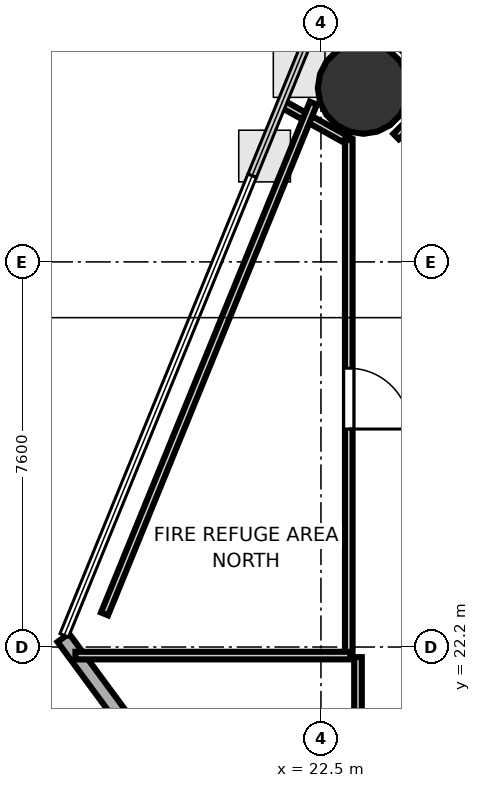
"""IFC4 building model, lengths in metres.
Left out: names, types, materials, properties, quantities, classifications, styles, units other than length and angle.
Written with IfcOpenShell. Run it as: python <this file> out.ifc"""

import sys

from ifc_helpers import new_model, si_unit, direction, frame, frame_2d, origin, origin_2d, place, context, subcontext, project, spatial, rectangle, hollow_circle, extrude, element, fill, save


model = new_model("IFC4")
c1 = context("Model", 3, precision=1e-05, world=origin(), true_north=direction((0.0, 1.0)))
c2 = subcontext(c1, "Body", "Model", "MODEL_VIEW")
j1 = project(units=[si_unit("LENGTHUNIT", "METRE"), si_unit("PLANEANGLEUNIT", "RADIAN")], contexts=[c1])
p1 = place(None, origin())
s1 = spatial("IfcSite", under=j1, at=p1, CompositionType="ELEMENT")
p2 = place(p1, origin())
s2 = spatial("IfcBuilding", under=s1, at=p2, CompositionType="ELEMENT")
p3 = place(p2, frame((0.0, 0.0, 47.9)))
s3 = spatial("IfcBuildingStorey", under=s2, at=p3, CompositionType="ELEMENT", Elevation=47.9)
p4 = place(p3, frame((23.338, 33.228, 0.0), z_axis=(0.0, 0.0, 1.0), x_axis=(1.0, 0.0, 0.0)))
e1 = element("IfcColumn", 1, at=p4, inside=s3, PredefinedType="COLUMN", context=c2, shape_type="SweptSolid", body=[
    extrude(hollow_circle(Radius=0.9, WallThickness=0.045, at=origin_2d()), origin(), (0.0, 0.0, 1.0), 4.6),
])
p5 = place(p3, frame((17.415, 22.384, 0.0), z_axis=(0.0, 0.0, 1.0), x_axis=(0.593055059992, -0.805161906587, 0.0)))
e2 = element("IfcWall", 2, at=p5, inside=s3, PredefinedType="SOLIDWALL", context=c2, shape_type="SweptSolid", body=[
    extrude(rectangle(XDim=12.668, YDim=0.28, at=frame_2d((6.334, 0.0))), origin(), (0.0, 0.0, 1.0), 4.42),
])
p6 = place(p5, frame((3.101, 0.0, 1.0)))
e3 = element("IfcOpeningElement", 3, at=p6, cuts=e2, PredefinedType="OPENING", context=c2, shape_type="SweptSolid", body=[
    extrude(rectangle(XDim=1.4, YDim=1.5, at=frame_2d((0.7, 0.75))), frame((0.0, 0.15, 0.0), z_axis=(0.0, -1.0, 0.0), x_axis=(1.0, 0.0, 0.0)), (0.0, 0.0, 1.0), 0.3),
])
p7 = place(p3, frame((21.708, 32.935, 0.0), z_axis=(0.0, 0.0, 1.0), x_axis=(0.873014270305, -0.487694662512, 0.0)))
e4 = element("IfcWall", 4, at=p7, inside=s3, PredefinedType="PARTITIONING", context=c2, shape_type="SweptSolid", body=[
    extrude(rectangle(XDim=1.555, YDim=0.15, at=frame_2d((0.777, 0.0))), origin(), (0.0, 0.0, 1.0), 2.94),
])
p8 = place(p3, frame((23.049, 32.204, 0.0), z_axis=(0.0, 0.0, 1.0), x_axis=(0.0, -1.0, 0.0)))
e5 = element("IfcWall", 5, at=p8, inside=s3, PredefinedType="PARTITIONING", context=c2, shape_type="SweptSolid", body=[
    extrude(rectangle(XDim=10.204, YDim=0.15, at=frame_2d((5.102, 0.0))), origin(), (0.0, 0.0, 1.0), 2.94),
])
p9 = place(p8, frame((4.502, 0.0, 0.0)))
e6 = element("IfcOpeningElement", 6, at=p9, cuts=e5, PredefinedType="OPENING", context=c2, shape_type="SweptSolid", body=[
    extrude(rectangle(XDim=1.2, YDim=2.15, at=frame_2d((0.6, 1.075))), frame((0.0, 0.085, 0.0), z_axis=(0.0, -1.0, 0.0), x_axis=(1.0, 0.0, 0.0)), (0.0, 0.0, 1.0), 0.17),
])
p10 = place(p3, frame((23.08, 22.031, 0.0), z_axis=(0.0, 0.0, 1.0), x_axis=(-1.0, 0.0, 0.0)))
e7 = element("IfcWall", 7, at=p10, inside=s3, PredefinedType="PARTITIONING", context=c2, shape_type="SweptSolid", body=[
    extrude(rectangle(XDim=5.426, YDim=0.15, at=frame_2d((2.713, 0.0))), origin(), (0.0, 0.0, 1.0), 2.94),
])
p11 = place(p3, frame((18.229, 22.854, 0.0), z_axis=(0.0, 0.0, 1.0), x_axis=(0.378492290578, 0.925604443579, 0.0)))
e8 = element("IfcWall", 8, at=p11, inside=s3, PredefinedType="PARTITIONING", context=c2, shape_type="SweptSolid", body=[
    extrude(rectangle(XDim=10.889, YDim=0.15, at=frame_2d((5.445, 0.0))), origin(), (0.0, 0.0, 1.0), 2.94),
])
p12 = place(p3, frame((24.291, 33.872, 0.0), z_axis=(0.0, 0.0, 1.0), x_axis=(-0.707386104394, 0.706827347597, 0.0)))
e9 = element("IfcWall", 9, at=p12, inside=s3, PredefinedType="PARTITIONING", context=c2, shape_type="SweptSolid", body=[
    extrude(rectangle(XDim=0.437, YDim=0.15, at=frame_2d((0.219, 0.0))), origin(), (0.0, 0.0, 1.0), 2.94),
])
p13 = place(p3, frame((23.231, 18.087, 0.0), z_axis=(0.0, 0.0, 1.0), x_axis=(0.0, 1.0, 0.0)))
e10 = element("IfcWall", 10, at=p13, inside=s3, PredefinedType="PARTITIONING", context=c2, shape_type="SweptSolid", body=[
    extrude(rectangle(XDim=3.913, YDim=0.15, at=frame_2d((1.957, 0.0))), origin(), (0.0, 0.0, 1.0), 2.94),
])
p14 = place(p13, frame((1.432, 0.0, 0.0)))
e11 = element("IfcOpeningElement", 11, at=p14, cuts=e10, PredefinedType="OPENING", context=c2, shape_type="SweptSolid", body=[
    extrude(rectangle(XDim=1.05, YDim=2.15, at=frame_2d((0.525, 1.075))), frame((0.0, 0.085, 0.0), z_axis=(0.0, -1.0, 0.0), x_axis=(1.0, 0.0, 0.0)), (0.0, 0.0, 1.0), 0.17),
])
p15 = place(p3, frame((23.982, 32.275, 0.0), z_axis=(0.0, 0.0, 1.0), x_axis=(0.707386104394, 0.706827347597, 0.0)))
e12 = element("IfcWall", 12, at=p15, inside=s3, PredefinedType="PARTITIONING", context=c2, shape_type="SweptSolid", body=[
    extrude(rectangle(XDim=0.437, YDim=0.15, at=frame_2d((0.219, 0.0))), origin(), (0.0, 0.0, 1.0), 2.94),
])
p16 = place(p9, origin())
e13 = element("IfcDoor", 13, at=p16, inside=s3, OperationType="SINGLE_SWING_RIGHT", PredefinedType="DOOR", context=c2, shape_type="SweptSolid", body=[
    extrude(rectangle(XDim=1.2, YDim=2.15, at=frame_2d((0.6, 1.075))), frame((0.0, 0.025, 0.0), z_axis=(0.0, -1.0, 0.0), x_axis=(1.0, 0.0, 0.0)), (0.0, 0.0, 1.0), 0.05),
])
fill(e6, e13)
save(model, sys.argv[1])
